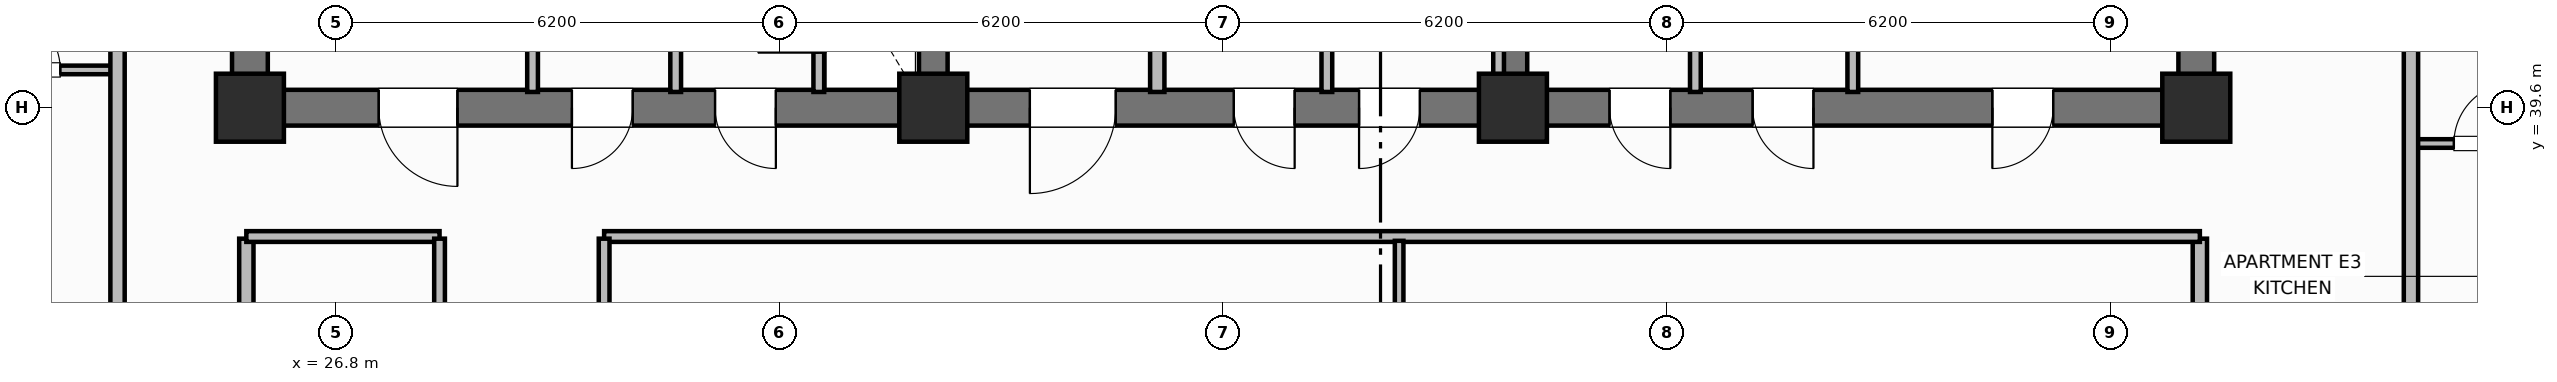
"""IFC4 building model, lengths in metres.
Left out: names, types, materials, properties, quantities, classifications, styles, units other than length and angle.
Written with IfcOpenShell. Run it as: python <this file> out.ifc"""

import sys

from ifc_helpers import new_model, si_unit, direction, frame, frame_2d, origin, origin_2d, place, context, subcontext, project, spatial, rectangle, extrude, element, fill, save


model = new_model("IFC4")
c1 = context("Model", 3, precision=1e-05, world=origin(), true_north=direction((0.0, 1.0)))
c2 = subcontext(c1, "Body", "Model", "MODEL_VIEW")
j1 = project(units=[si_unit("LENGTHUNIT", "METRE"), si_unit("PLANEANGLEUNIT", "RADIAN")], contexts=[c1])
p1 = place(None, origin())
s1 = spatial("IfcSite", under=j1, at=p1, CompositionType="ELEMENT")
p2 = place(p1, origin())
s2 = spatial("IfcBuilding", under=s1, at=p2, CompositionType="ELEMENT")
p3 = place(p2, frame((0.0, 0.0, 188.5)))
s3 = spatial("IfcBuildingStorey", under=s2, at=p3, CompositionType="ELEMENT", Elevation=188.5)
for number, where, z_axis, x_axis in (
    (1, (25.6, 39.85, 0.0), (0.0, 0.0, 1.0), (0.0, 1.0, 0.0)),
    (2, (52.8, 39.85, 0.0), (0.0, 0.0, 1.0), (0.0, 1.0, 0.0)),
):
    element("IfcWall", number, at=place(p3, frame(where, z_axis=z_axis, x_axis=x_axis)), inside=s3, PredefinedType="SHEAR", context=c2, shape_type="SweptSolid", body=[
        extrude(rectangle(XDim=5.7, YDim=0.5, at=frame_2d((2.85, 0.0))), origin(), (0.0, 0.0, 1.0), 3.7),
    ])
p4 = place(p3, frame((52.8, 39.6, 0.0), z_axis=(0.0, 0.0, 1.0), x_axis=(-1.0, 0.0, 0.0)))
e3 = element("IfcWall", 3, at=p4, inside=s3, PredefinedType="SHEAR", context=c2, shape_type="SweptSolid", body=[
    extrude(rectangle(XDim=27.2, YDim=0.5, at=frame_2d((13.6, 0.0))), origin(), (0.0, 0.0, 1.0), 3.7),
])
p5 = place(p4, frame((24.3, 0.0, 0.0)))
e4 = element("IfcOpeningElement", 4, at=p5, cuts=e3, PredefinedType="OPENING", context=c2, shape_type="SweptSolid", body=[
    extrude(rectangle(XDim=1.1, YDim=2.15, at=frame_2d((0.55, 1.075))), frame((0.0, 0.26, 0.0), z_axis=(0.0, -1.0, 0.0), x_axis=(1.0, 0.0, 0.0)), (0.0, 0.0, 1.0), 0.52),
])
p6 = place(p4, frame((21.85, 0.0, 0.0)))
e5 = element("IfcOpeningElement", 5, at=p6, cuts=e3, PredefinedType="OPENING", context=c2, shape_type="SweptSolid", body=[
    extrude(rectangle(XDim=0.85, YDim=2.1, at=frame_2d((0.425, 1.05))), frame((0.0, 0.26, 0.0), z_axis=(0.0, -1.0, 0.0), x_axis=(1.0, 0.0, 0.0)), (0.0, 0.0, 1.0), 0.52),
])
p7 = place(p4, frame((19.85, 0.0, 0.0)))
e6 = element("IfcOpeningElement", 6, at=p7, cuts=e3, PredefinedType="OPENING", context=c2, shape_type="SweptSolid", body=[
    extrude(rectangle(XDim=0.85, YDim=2.1, at=frame_2d((0.425, 1.05))), frame((0.0, 0.26, 0.0), z_axis=(0.0, -1.0, 0.0), x_axis=(1.0, 0.0, 0.0)), (0.0, 0.0, 1.0), 0.52),
])
p8 = place(p4, frame((15.1, 0.0, 0.0)))
e7 = element("IfcOpeningElement", 7, at=p8, cuts=e3, PredefinedType="OPENING", context=c2, shape_type="SweptSolid", body=[
    extrude(rectangle(XDim=1.2, YDim=2.15, at=frame_2d((0.6, 1.075))), frame((0.0, 0.26, 0.0), z_axis=(0.0, -1.0, 0.0), x_axis=(1.0, 0.0, 0.0)), (0.0, 0.0, 1.0), 0.52),
])
p9 = place(p4, frame((12.6, 0.0, 0.0)))
e8 = element("IfcOpeningElement", 8, at=p9, cuts=e3, PredefinedType="OPENING", context=c2, shape_type="SweptSolid", body=[
    extrude(rectangle(XDim=0.85, YDim=2.1, at=frame_2d((0.425, 1.05))), frame((0.0, 0.26, 0.0), z_axis=(0.0, -1.0, 0.0), x_axis=(1.0, 0.0, 0.0)), (0.0, 0.0, 1.0), 0.52),
])
p10 = place(p4, frame((10.85, 0.0, 0.0)))
e9 = element("IfcOpeningElement", 9, at=p10, cuts=e3, PredefinedType="OPENING", context=c2, shape_type="SweptSolid", body=[
    extrude(rectangle(XDim=0.85, YDim=2.1, at=frame_2d((0.425, 1.05))), frame((0.0, 0.26, 0.0), z_axis=(0.0, -1.0, 0.0), x_axis=(1.0, 0.0, 0.0)), (0.0, 0.0, 1.0), 0.52),
])
p11 = place(p4, frame((7.35, 0.0, 0.0)))
e10 = element("IfcOpeningElement", 10, at=p11, cuts=e3, PredefinedType="OPENING", context=c2, shape_type="SweptSolid", body=[
    extrude(rectangle(XDim=0.85, YDim=2.1, at=frame_2d((0.425, 1.05))), frame((0.0, 0.26, 0.0), z_axis=(0.0, -1.0, 0.0), x_axis=(1.0, 0.0, 0.0)), (0.0, 0.0, 1.0), 0.52),
])
p12 = place(p4, frame((5.35, 0.0, 0.0)))
e11 = element("IfcOpeningElement", 11, at=p12, cuts=e3, PredefinedType="OPENING", context=c2, shape_type="SweptSolid", body=[
    extrude(rectangle(XDim=0.85, YDim=2.1, at=frame_2d((0.425, 1.05))), frame((0.0, 0.26, 0.0), z_axis=(0.0, -1.0, 0.0), x_axis=(1.0, 0.0, 0.0)), (0.0, 0.0, 1.0), 0.52),
])
p13 = place(p4, frame((2.0, 0.0, 0.0)))
e12 = element("IfcOpeningElement", 12, at=p13, cuts=e3, PredefinedType="OPENING", context=c2, shape_type="SweptSolid", body=[
    extrude(rectangle(XDim=0.85, YDim=2.1, at=frame_2d((0.425, 1.05))), frame((0.0, 0.26, 0.0), z_axis=(0.0, -1.0, 0.0), x_axis=(1.0, 0.0, 0.0)), (0.0, 0.0, 1.0), 0.52),
])
for number, where, z_axis, x_axis in (
    (13, (35.15, 39.85, 0.0), (0.0, 0.0, 1.0), (0.0, 1.0, 0.0)),
    (14, (43.25, 39.85, 0.0), (0.0, 0.0, 1.0), (0.0, 1.0, 0.0)),
):
    element("IfcWall", number, at=place(p3, frame(where, z_axis=z_axis, x_axis=x_axis)), inside=s3, PredefinedType="SHEAR", context=c2, shape_type="SweptSolid", body=[
        extrude(rectangle(XDim=5.7, YDim=0.4, at=frame_2d((2.85, 0.0))), origin(), (0.0, 0.0, 1.0), 3.7),
    ])
for number, where, z_axis, x_axis in (
    (15, (25.6, 39.6, 0.0), (0.0, 0.0, 1.0), (1.0, 0.0, 0.0)),
    (16, (35.15, 39.6, 0.0), (0.0, 0.0, 1.0), (1.0, 0.0, 0.0)),
    (17, (43.25, 39.6, 0.0), (0.0, 0.0, 1.0), (1.0, 0.0, 0.0)),
    (18, (52.8, 39.6, 0.0), (0.0, 0.0, 1.0), (1.0, 0.0, 0.0)),
):
    element("IfcColumn", number, at=place(p3, frame(where, z_axis=z_axis, x_axis=x_axis)), inside=s3, PredefinedType="COLUMN", context=c2, shape_type="SweptSolid", body=[
        extrude(rectangle(XDim=0.95, YDim=0.95, at=origin_2d()), origin(), (0.0, 0.0, 1.0), 3.7),
    ])
p14 = place(p3, frame((33.55, 39.82, 0.0), z_axis=(0.0, 0.0, 1.0), x_axis=(0.0, 1.0, 0.0)))
e19 = element("IfcWall", 19, at=p14, inside=s3, PredefinedType="PARTITIONING", context=c2, shape_type="SweptSolid", body=[
    extrude(rectangle(XDim=2.13, YDim=0.15, at=frame_2d((1.065, 0.0))), origin(), (0.0, 0.0, 1.0), 2.55),
])
p15 = place(p14, frame((0.55, 0.0, 0.0)))
e20 = element("IfcOpeningElement", 20, at=p15, cuts=e19, PredefinedType="OPENING", context=c2, shape_type="SweptSolid", body=[
    extrude(rectangle(XDim=0.85, YDim=2.05, at=frame_2d((0.425, 1.025))), frame((0.0, 0.085, 0.0), z_axis=(0.0, -1.0, 0.0), x_axis=(1.0, 0.0, 0.0)), (0.0, 0.0, 1.0), 0.17),
])
for number, where, z_axis, x_axis in (
    (21, (29.55, 39.82, 0.0), (0.0, 0.0, 1.0), (0.0, 1.0, 0.0)),
    (22, (31.55, 39.82, 0.0), (0.0, 0.0, 1.0), (0.0, 1.0, 0.0)),
):
    element("IfcWall", number, at=place(p3, frame(where, z_axis=z_axis, x_axis=x_axis)), inside=s3, PredefinedType="PARTITIONING", context=c2, shape_type="SweptSolid", body=[
        extrude(rectangle(XDim=2.13, YDim=0.15, at=frame_2d((1.065, 0.0))), origin(), (0.0, 0.0, 1.0), 2.55),
    ])
p16 = place(p3, frame((38.28, 39.82, 0.0), z_axis=(0.0, 0.0, 1.0), x_axis=(0.0, 1.0, 0.0)))
e23 = element("IfcWall", 23, at=p16, inside=s3, PredefinedType="PARTITIONING", context=c2, shape_type="SweptSolid", body=[
    extrude(rectangle(XDim=5.63, YDim=0.2, at=frame_2d((2.815, 0.0))), origin(), (0.0, 0.0, 1.0), 2.55),
])
for number, where, z_axis, x_axis in (
    (24, (43.05, 39.82, 0.0), (0.0, 0.0, 1.0), (0.0, 1.0, 0.0)),
    (25, (40.65, 39.82, 0.0), (0.0, 0.0, 1.0), (0.0, 1.0, 0.0)),
    (26, (45.8, 39.82, 0.0), (0.0, 0.0, 1.0), (0.0, 1.0, 0.0)),
):
    element("IfcWall", number, at=place(p3, frame(where, z_axis=z_axis, x_axis=x_axis)), inside=s3, PredefinedType="PARTITIONING", context=c2, shape_type="SweptSolid", body=[
        extrude(rectangle(XDim=5.63, YDim=0.15, at=frame_2d((2.815, 0.0))), origin(), (0.0, 0.0, 1.0), 2.55),
    ])
p17 = place(p3, frame((48.0, 39.82, 0.0), z_axis=(0.0, 0.0, 1.0), x_axis=(0.0, 1.0, 0.0)))
e27 = element("IfcWall", 27, at=p17, inside=s3, PredefinedType="PARTITIONING", context=c2, shape_type="SweptSolid", body=[
    extrude(rectangle(XDim=2.73, YDim=0.15, at=frame_2d((1.365, 0.0))), origin(), (0.0, 0.0, 1.0), 2.55),
])
for number, where, z_axis, x_axis in (
    (28, (25.55, 18.63, 0.0), (0.0, 0.0, 1.0), (0.0, 1.0, 0.0)),
    (29, (52.85, 18.63, 0.0), (0.0, 0.0, 1.0), (0.0, 1.0, 0.0)),
):
    element("IfcWall", number, at=place(p3, frame(where, z_axis=z_axis, x_axis=x_axis)), inside=s3, PredefinedType="PARTITIONING", context=c2, shape_type="SweptSolid", body=[
        extrude(rectangle(XDim=19.14, YDim=0.2, at=frame_2d((9.57, 0.0))), origin(), (0.0, 0.0, 1.0), 2.55),
    ])
p18 = place(p3, frame((25.55, 37.8, 0.0), z_axis=(0.0, 0.0, 1.0), x_axis=(1.0, 0.0, 0.0)))
e30 = element("IfcWall", 30, at=p18, inside=s3, PredefinedType="PARTITIONING", context=c2, shape_type="SweptSolid", body=[
    extrude(rectangle(XDim=2.7, YDim=0.15, at=frame_2d((1.35, 0.0))), origin(), (0.0, 0.0, 1.0), 2.55),
])
p19 = place(p3, frame((30.55, 37.8, 0.0), z_axis=(0.0, 0.0, 1.0), x_axis=(1.0, 0.0, 0.0)))
e31 = element("IfcWall", 31, at=p19, inside=s3, PredefinedType="PARTITIONING", context=c2, shape_type="SweptSolid", body=[
    extrude(rectangle(XDim=22.3, YDim=0.15, at=frame_2d((11.15, 0.0))), origin(), (0.0, 0.0, 1.0), 2.55),
])
p20 = place(p3, frame((41.66, 25.56, 0.0), z_axis=(0.0, 0.0, 1.0), x_axis=(0.0, 1.0, 0.0)))
e32 = element("IfcWall", 32, at=p20, inside=s3, PredefinedType="PARTITIONING", context=c2, shape_type="SweptSolid", body=[
    extrude(rectangle(XDim=12.18, YDim=0.12, at=frame_2d((6.09, 0.0))), origin(), (0.0, 0.0, 1.0), 2.55),
])
p21 = place(p20, frame((2.0, 0.0, 0.0)))
e33 = element("IfcOpeningElement", 33, at=p21, cuts=e32, PredefinedType="OPENING", context=c2, shape_type="SweptSolid", body=[
    extrude(rectangle(XDim=0.9, YDim=2.1, at=frame_2d((0.45, 1.05))), frame((0.0, 0.07, 0.0), z_axis=(0.0, -1.0, 0.0), x_axis=(1.0, 0.0, 0.0)), (0.0, 0.0, 1.0), 0.14),
])
p22 = place(p3, frame((28.25, 18.63, 0.0), z_axis=(0.0, 0.0, 1.0), x_axis=(0.0, 1.0, 0.0)))
e34 = element("IfcWall", 34, at=p22, inside=s3, PredefinedType="PARTITIONING", context=c2, shape_type="SweptSolid", body=[
    extrude(rectangle(XDim=19.14, YDim=0.15, at=frame_2d((9.57, 0.0))), origin(), (0.0, 0.0, 1.0), 2.55),
])
p23 = place(p22, frame((3.0, 0.0, 0.0)))
e35 = element("IfcOpeningElement", 35, at=p23, cuts=e34, PredefinedType="OPENING", context=c2, shape_type="SweptSolid", body=[
    extrude(rectangle(XDim=0.9, YDim=2.1, at=frame_2d((0.45, 1.05))), frame((0.0, 0.085, 0.0), z_axis=(0.0, -1.0, 0.0), x_axis=(1.0, 0.0, 0.0)), (0.0, 0.0, 1.0), 0.17),
])
p24 = place(p22, frame((11.5, 0.0, 0.0)))
e36 = element("IfcOpeningElement", 36, at=p24, cuts=e34, PredefinedType="OPENING", context=c2, shape_type="SweptSolid", body=[
    extrude(rectangle(XDim=0.9, YDim=2.1, at=frame_2d((0.45, 1.05))), frame((0.0, 0.085, 0.0), z_axis=(0.0, -1.0, 0.0), x_axis=(1.0, 0.0, 0.0)), (0.0, 0.0, 1.0), 0.17),
])
p25 = place(p3, frame((30.55, 18.63, 0.0), z_axis=(0.0, 0.0, 1.0), x_axis=(0.0, 1.0, 0.0)))
e37 = element("IfcWall", 37, at=p25, inside=s3, PredefinedType="PARTITIONING", context=c2, shape_type="SweptSolid", body=[
    extrude(rectangle(XDim=19.14, YDim=0.15, at=frame_2d((9.57, 0.0))), origin(), (0.0, 0.0, 1.0), 2.55),
])
p26 = place(p25, frame((2.2, 0.0, 0.0)))
e38 = element("IfcOpeningElement", 38, at=p26, cuts=e37, PredefinedType="OPENING", context=c2, shape_type="SweptSolid", body=[
    extrude(rectangle(XDim=1.0, YDim=2.15, at=frame_2d((0.5, 1.075))), frame((0.0, 0.085, 0.0), z_axis=(0.0, -1.0, 0.0), x_axis=(1.0, 0.0, 0.0)), (0.0, 0.0, 1.0), 0.17),
])
p27 = place(p25, frame((8.89, 0.0, 0.0)))
e39 = element("IfcOpeningElement", 39, at=p27, cuts=e37, PredefinedType="OPENING", context=c2, shape_type="SweptSolid", body=[
    extrude(rectangle(XDim=1.0, YDim=2.15, at=frame_2d((0.5, 1.075))), frame((0.0, 0.085, 0.0), z_axis=(0.0, -1.0, 0.0), x_axis=(1.0, 0.0, 0.0)), (0.0, 0.0, 1.0), 0.17),
])
p28 = place(p3, frame((21.5, 40.128, 0.0), z_axis=(0.0, 0.0, 1.0), x_axis=(1.0, 0.0, 0.0)))
e40 = element("IfcWall", 40, at=p28, inside=s3, PredefinedType="PARTITIONING", context=c2, shape_type="SweptSolid", body=[
    extrude(rectangle(XDim=2.25, YDim=0.12, at=frame_2d((1.125, 0.0))), origin(), (0.0, 0.0, 1.0), 2.55),
])
p29 = place(p28, frame((0.6, 0.0, 0.0)))
e41 = element("IfcOpeningElement", 41, at=p29, cuts=e40, PredefinedType="OPENING", context=c2, shape_type="SweptSolid", body=[
    extrude(rectangle(XDim=0.85, YDim=2.1, at=frame_2d((0.425, 1.05))), frame((0.0, 0.07, 0.0), z_axis=(0.0, -1.0, 0.0), x_axis=(1.0, 0.0, 0.0)), (0.0, 0.0, 1.0), 0.14),
])
p30 = place(p3, frame((23.75, 10.6, 0.0), z_axis=(0.0, 0.0, 1.0), x_axis=(0.0, 1.0, 0.0)))
e42 = element("IfcWall", 42, at=p30, inside=s3, PredefinedType="PARTITIONING", context=c2, shape_type="SweptSolid", body=[
    extrude(rectangle(XDim=35.2, YDim=0.2, at=frame_2d((17.6, 0.0))), origin(), (0.0, 0.0, 1.0), 2.55),
])
p31 = place(p30, frame((2.65, 0.0, 0.0)))
e43 = element("IfcOpeningElement", 43, at=p31, cuts=e42, PredefinedType="OPENING", context=c2, shape_type="SweptSolid", body=[
    extrude(rectangle(XDim=1.0, YDim=2.15, at=frame_2d((0.5, 1.075))), frame((0.0, 0.11, 0.0), z_axis=(0.0, -1.0, 0.0), x_axis=(1.0, 0.0, 0.0)), (0.0, 0.0, 1.0), 0.22),
])
p32 = place(p30, frame((13.222, 0.0, 0.0)))
e44 = element("IfcOpeningElement", 44, at=p32, cuts=e42, PredefinedType="OPENING", context=c2, shape_type="SweptSolid", body=[
    extrude(rectangle(XDim=1.0, YDim=2.15, at=frame_2d((0.5, 1.075))), frame((0.0, 0.11, 0.0), z_axis=(0.0, -1.0, 0.0), x_axis=(1.0, 0.0, 0.0)), (0.0, 0.0, 1.0), 0.22),
])
p33 = place(p30, frame((24.838, 0.0, 0.0)))
e45 = element("IfcOpeningElement", 45, at=p33, cuts=e42, PredefinedType="OPENING", context=c2, shape_type="SweptSolid", body=[
    extrude(rectangle(XDim=1.0, YDim=2.15, at=frame_2d((0.5, 1.075))), frame((0.0, 0.11, 0.0), z_axis=(0.0, -1.0, 0.0), x_axis=(1.0, 0.0, 0.0)), (0.0, 0.0, 1.0), 0.22),
])
p34 = place(p3, frame((55.8, 39.1, 0.0), z_axis=(0.0, 0.0, 1.0), x_axis=(1.0, 0.0, 0.0)))
e46 = element("IfcWall", 46, at=p34, inside=s3, PredefinedType="PARTITIONING", context=c2, shape_type="SweptSolid", body=[
    extrude(rectangle(XDim=2.25, YDim=0.12, at=frame_2d((1.125, 0.0))), origin(), (0.0, 0.0, 1.0), 2.55),
])
p35 = place(p34, frame((0.6, 0.0, 0.0)))
e47 = element("IfcOpeningElement", 47, at=p35, cuts=e46, PredefinedType="OPENING", context=c2, shape_type="SweptSolid", body=[
    extrude(rectangle(XDim=0.85, YDim=2.1, at=frame_2d((0.425, 1.05))), frame((0.0, 0.07, 0.0), z_axis=(0.0, -1.0, 0.0), x_axis=(1.0, 0.0, 0.0)), (0.0, 0.0, 1.0), 0.14),
])
p36 = place(p3, frame((55.8, 10.6, 0.0), z_axis=(0.0, 0.0, 1.0), x_axis=(0.0, 1.0, 0.0)))
e48 = element("IfcWall", 48, at=p36, inside=s3, PredefinedType="PARTITIONING", context=c2, shape_type="SweptSolid", body=[
    extrude(rectangle(XDim=35.2, YDim=0.2, at=frame_2d((17.6, 0.0))), origin(), (0.0, 0.0, 1.0), 2.55),
])
p37 = place(p36, frame((2.65, 0.0, 0.0)))
e49 = element("IfcOpeningElement", 49, at=p37, cuts=e48, PredefinedType="OPENING", context=c2, shape_type="SweptSolid", body=[
    extrude(rectangle(XDim=1.0, YDim=2.15, at=frame_2d((0.5, 1.075))), frame((0.0, 0.11, 0.0), z_axis=(0.0, -1.0, 0.0), x_axis=(1.0, 0.0, 0.0)), (0.0, 0.0, 1.0), 0.22),
])
p38 = place(p36, frame((12.87, 0.0, 0.0)))
e50 = element("IfcOpeningElement", 50, at=p38, cuts=e48, PredefinedType="OPENING", context=c2, shape_type="SweptSolid", body=[
    extrude(rectangle(XDim=1.0, YDim=2.15, at=frame_2d((0.5, 1.075))), frame((0.0, 0.11, 0.0), z_axis=(0.0, -1.0, 0.0), x_axis=(1.0, 0.0, 0.0)), (0.0, 0.0, 1.0), 0.22),
])
p39 = place(p36, frame((23.65, 0.0, 0.0)))
e51 = element("IfcOpeningElement", 51, at=p39, cuts=e48, PredefinedType="OPENING", context=c2, shape_type="SweptSolid", body=[
    extrude(rectangle(XDim=1.0, YDim=2.15, at=frame_2d((0.5, 1.075))), frame((0.0, 0.11, 0.0), z_axis=(0.0, -1.0, 0.0), x_axis=(1.0, 0.0, 0.0)), (0.0, 0.0, 1.0), 0.22),
])
p40 = place(p15, origin())
e52 = element("IfcDoor", 52, at=p40, inside=s3, OperationType="SINGLE_SWING_LEFT", PredefinedType="TRAPDOOR", context=c2, shape_type="SweptSolid", body=[
    extrude(rectangle(XDim=0.85, YDim=2.05, at=frame_2d((0.425, 1.025))), frame((0.0, 0.025, 0.0), z_axis=(0.0, -1.0, 0.0), x_axis=(1.0, 0.0, 0.0)), (0.0, 0.0, 1.0), 0.05),
])
fill(e20, e52)
p41 = place(p29, origin())
e53 = element("IfcDoor", 53, at=p41, inside=s3, OperationType="SINGLE_SWING_LEFT", PredefinedType="DOOR", context=c2, shape_type="SweptSolid", body=[
    extrude(rectangle(XDim=0.85, YDim=2.1, at=frame_2d((0.425, 1.05))), frame((0.0, 0.025, 0.0), z_axis=(0.0, -1.0, 0.0), x_axis=(1.0, 0.0, 0.0)), (0.0, 0.0, 1.0), 0.05),
])
fill(e41, e53)
p42 = place(p35, origin())
e54 = element("IfcDoor", 54, at=p42, inside=s3, OperationType="SINGLE_SWING_RIGHT", PredefinedType="DOOR", context=c2, shape_type="SweptSolid", body=[
    extrude(rectangle(XDim=0.85, YDim=2.1, at=frame_2d((0.425, 1.05))), frame((0.0, 0.025, 0.0), z_axis=(0.0, -1.0, 0.0), x_axis=(1.0, 0.0, 0.0)), (0.0, 0.0, 1.0), 0.05),
])
fill(e47, e54)
p43 = place(p5, origin())
e55 = element("IfcDoor", 55, at=p43, inside=s3, OperationType="SINGLE_SWING_LEFT", PredefinedType="DOOR", context=c2, shape_type="SweptSolid", body=[
    extrude(rectangle(XDim=1.1, YDim=2.15, at=frame_2d((0.55, 1.075))), frame((0.0, 0.025, 0.0), z_axis=(0.0, -1.0, 0.0), x_axis=(1.0, 0.0, 0.0)), (0.0, 0.0, 1.0), 0.05),
])
fill(e4, e55)
p44 = place(p6, origin())
e56 = element("IfcDoor", 56, at=p44, inside=s3, OperationType="SINGLE_SWING_RIGHT", PredefinedType="DOOR", context=c2, shape_type="SweptSolid", body=[
    extrude(rectangle(XDim=0.85, YDim=2.1, at=frame_2d((0.425, 1.05))), frame((0.0, 0.025, 0.0), z_axis=(0.0, -1.0, 0.0), x_axis=(1.0, 0.0, 0.0)), (0.0, 0.0, 1.0), 0.05),
])
fill(e5, e56)
p45 = place(p7, origin())
e57 = element("IfcDoor", 57, at=p45, inside=s3, OperationType="SINGLE_SWING_LEFT", PredefinedType="DOOR", context=c2, shape_type="SweptSolid", body=[
    extrude(rectangle(XDim=0.85, YDim=2.1, at=frame_2d((0.425, 1.05))), frame((0.0, 0.025, 0.0), z_axis=(0.0, -1.0, 0.0), x_axis=(1.0, 0.0, 0.0)), (0.0, 0.0, 1.0), 0.05),
])
fill(e6, e57)
p46 = place(p8, origin())
e58 = element("IfcDoor", 58, at=p46, inside=s3, OperationType="SINGLE_SWING_RIGHT", PredefinedType="DOOR", context=c2, shape_type="SweptSolid", body=[
    extrude(rectangle(XDim=1.2, YDim=2.15, at=frame_2d((0.6, 1.075))), frame((0.0, 0.025, 0.0), z_axis=(0.0, -1.0, 0.0), x_axis=(1.0, 0.0, 0.0)), (0.0, 0.0, 1.0), 0.05),
])
fill(e7, e58)
p47 = place(p9, origin())
e59 = element("IfcDoor", 59, at=p47, inside=s3, OperationType="SINGLE_SWING_LEFT", PredefinedType="DOOR", context=c2, shape_type="SweptSolid", body=[
    extrude(rectangle(XDim=0.85, YDim=2.1, at=frame_2d((0.425, 1.05))), frame((0.0, 0.025, 0.0), z_axis=(0.0, -1.0, 0.0), x_axis=(1.0, 0.0, 0.0)), (0.0, 0.0, 1.0), 0.05),
])
fill(e8, e59)
p48 = place(p10, origin())
e60 = element("IfcDoor", 60, at=p48, inside=s3, OperationType="SINGLE_SWING_RIGHT", PredefinedType="DOOR", context=c2, shape_type="SweptSolid", body=[
    extrude(rectangle(XDim=0.85, YDim=2.1, at=frame_2d((0.425, 1.05))), frame((0.0, 0.025, 0.0), z_axis=(0.0, -1.0, 0.0), x_axis=(1.0, 0.0, 0.0)), (0.0, 0.0, 1.0), 0.05),
])
fill(e9, e60)
p49 = place(p11, origin())
e61 = element("IfcDoor", 61, at=p49, inside=s3, OperationType="SINGLE_SWING_LEFT", PredefinedType="DOOR", context=c2, shape_type="SweptSolid", body=[
    extrude(rectangle(XDim=0.85, YDim=2.1, at=frame_2d((0.425, 1.05))), frame((0.0, 0.025, 0.0), z_axis=(0.0, -1.0, 0.0), x_axis=(1.0, 0.0, 0.0)), (0.0, 0.0, 1.0), 0.05),
])
fill(e10, e61)
p50 = place(p12, origin())
e62 = element("IfcDoor", 62, at=p50, inside=s3, OperationType="SINGLE_SWING_LEFT", PredefinedType="DOOR", context=c2, shape_type="SweptSolid", body=[
    extrude(rectangle(XDim=0.85, YDim=2.1, at=frame_2d((0.425, 1.05))), frame((0.0, 0.025, 0.0), z_axis=(0.0, -1.0, 0.0), x_axis=(1.0, 0.0, 0.0)), (0.0, 0.0, 1.0), 0.05),
])
fill(e11, e62)
p51 = place(p13, origin())
e63 = element("IfcDoor", 63, at=p51, inside=s3, OperationType="SINGLE_SWING_RIGHT", PredefinedType="DOOR", context=c2, shape_type="SweptSolid", body=[
    extrude(rectangle(XDim=0.85, YDim=2.1, at=frame_2d((0.425, 1.05))), frame((0.0, 0.025, 0.0), z_axis=(0.0, -1.0, 0.0), x_axis=(1.0, 0.0, 0.0)), (0.0, 0.0, 1.0), 0.05),
])
fill(e12, e63)
save(model, sys.argv[1])
